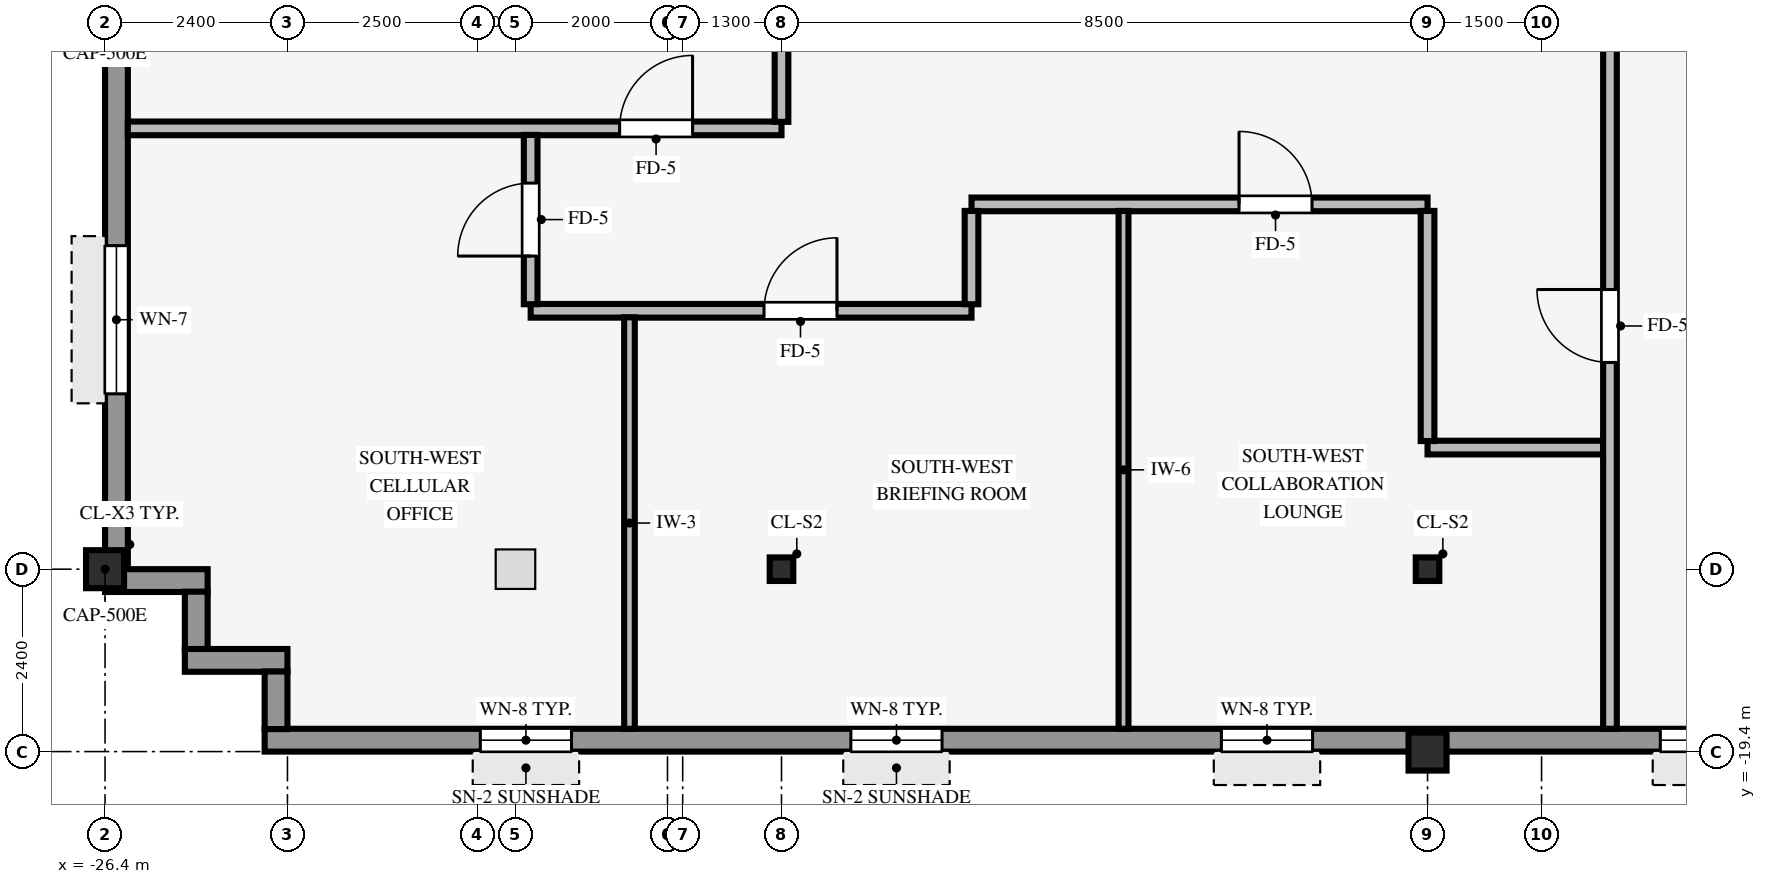
"""IFC4 building model, lengths in metres.
Left out: names, types, materials, properties, quantities, classifications, styles, units other than length and angle.
Written with IfcOpenShell. Run it as: python <this file> out.ifc"""

import sys

from ifc_helpers import new_model, si_unit, direction, frame, frame_2d, origin, origin_2d, place, context, subcontext, project, spatial, rectangle, hollow_rectangle, i_section, extrude, source, transform, mapped, element, fill, save


model = new_model("IFC4")
c1 = context("Model", 3, precision=1e-05, world=origin(), true_north=direction((0.0, 1.0)))
c2 = subcontext(c1, "Body", "Model", "MODEL_VIEW")
j1 = project(units=[si_unit("LENGTHUNIT", "METRE"), si_unit("PLANEANGLEUNIT", "RADIAN")], contexts=[c1])
p1 = place(None, origin())
s1 = spatial("IfcSite", under=j1, at=p1, CompositionType="ELEMENT")
p2 = place(p1, origin())
s2 = spatial("IfcBuilding", under=s1, at=p2, CompositionType="ELEMENT")
p3 = place(p2, frame((0.0, 0.0, 242.0)))
s3 = spatial("IfcBuildingStorey", under=s2, at=p3, CompositionType="ELEMENT", Elevation=242.0)
for number, where, z_axis, x_axis in (
    (1, (-26.4, -17.0, 0.0), (0.0, 0.0, 1.0), (1.0, 0.0, 0.0)),
    (2, (-9.0, -19.4, 0.0), (0.0, 0.0, 1.0), (1.0, 0.0, 0.0)),
):
    element("IfcColumn", number, at=place(p3, frame(where, z_axis=z_axis, x_axis=x_axis)), inside=s3, PredefinedType="COLUMN", context=c2, shape_type="SweptSolid", body=[
        extrude(hollow_rectangle(XDim=0.5, YDim=0.5, WallThickness=0.032, InnerFilletRadius=0.032, OuterFilletRadius=0.064, at=origin_2d()), origin(), (0.0, 0.0, 1.0), 3.25),
    ])
for number, where, z_axis, x_axis in (
    (3, (-17.5, -17.0, 0.0), (0.0, 0.0, 1.0), (1.0, 0.0, 0.0)),
    (4, (-9.0, -17.0, 0.0), (0.0, 0.0, 1.0), (1.0, 0.0, 0.0)),
):
    element("IfcColumn", number, at=place(p3, frame(where, z_axis=z_axis, x_axis=x_axis)), inside=s3, PredefinedType="COLUMN", context=c2, shape_type="SweptSolid", body=[
        extrude(i_section(OverallWidth=0.31, OverallDepth=0.31, WebThickness=0.015, FlangeThickness=0.015, FilletRadius=0.015, at=origin_2d()), origin(), (0.0, 0.0, 1.0), 3.25),
    ])
p4 = place(p3, frame((-24.3, -19.25, 0.0), z_axis=(0.0, 0.0, 1.0), x_axis=(1.0, 0.0, 0.0)))
e5 = element("IfcWall", 5, at=p4, inside=s3, PredefinedType="STANDARD", context=c2, shape_type="SweptSolid", body=[
    extrude(rectangle(XDim=41.0, YDim=0.3, at=frame_2d((20.5, 0.0))), origin(), (0.0, 0.0, 1.0), 2.585),
])
p5 = place(p4, frame((2.837, 0.0, 0.8)))
e6 = element("IfcOpeningElement", 6, at=p5, cuts=e5, PredefinedType="OPENING", context=c2, shape_type="SweptSolid", body=[
    extrude(rectangle(XDim=1.2, YDim=1.48, at=frame_2d((0.6, 0.74))), frame((0.0, 0.16, 0.0), z_axis=(0.0, -1.0, 0.0), x_axis=(1.0, 0.0, 0.0)), (0.0, 0.0, 1.0), 0.32),
])
p6 = place(p4, frame((7.712, 0.0, 0.8)))
e7 = element("IfcOpeningElement", 7, at=p6, cuts=e5, PredefinedType="OPENING", context=c2, shape_type="SweptSolid", body=[
    extrude(rectangle(XDim=1.2, YDim=1.48, at=frame_2d((0.6, 0.74))), frame((0.0, 0.16, 0.0), z_axis=(0.0, -1.0, 0.0), x_axis=(1.0, 0.0, 0.0)), (0.0, 0.0, 1.0), 0.32),
])
p7 = place(p4, frame((12.587, 0.0, 0.8)))
e8 = element("IfcOpeningElement", 8, at=p7, cuts=e5, PredefinedType="OPENING", context=c2, shape_type="SweptSolid", body=[
    extrude(rectangle(XDim=1.2, YDim=1.48, at=frame_2d((0.6, 0.74))), frame((0.0, 0.16, 0.0), z_axis=(0.0, -1.0, 0.0), x_axis=(1.0, 0.0, 0.0)), (0.0, 0.0, 1.0), 0.32),
])
p8 = place(p4, frame((18.363, 0.0, 0.8)))
e9 = element("IfcOpeningElement", 9, at=p8, cuts=e5, PredefinedType="OPENING", context=c2, shape_type="SweptSolid", body=[
    extrude(rectangle(XDim=1.2, YDim=1.48, at=frame_2d((0.6, 0.74))), frame((0.0, 0.16, 0.0), z_axis=(0.0, -1.0, 0.0), x_axis=(1.0, 0.0, 0.0)), (0.0, 0.0, 1.0), 0.32),
])
p9 = place(p4, frame((21.887, 0.0, 0.8)))
e10 = element("IfcOpeningElement", 10, at=p9, cuts=e5, PredefinedType="OPENING", context=c2, shape_type="SweptSolid", body=[
    extrude(rectangle(XDim=1.2, YDim=1.48, at=frame_2d((0.6, 0.74))), frame((0.0, 0.16, 0.0), z_axis=(0.0, -1.0, 0.0), x_axis=(1.0, 0.0, 0.0)), (0.0, 0.0, 1.0), 0.32),
])
p10 = place(p4, frame((27.212, 0.0, 0.8)))
e11 = element("IfcOpeningElement", 11, at=p10, cuts=e5, PredefinedType="OPENING", context=c2, shape_type="SweptSolid", body=[
    extrude(rectangle(XDim=1.2, YDim=1.48, at=frame_2d((0.6, 0.74))), frame((0.0, 0.16, 0.0), z_axis=(0.0, -1.0, 0.0), x_axis=(1.0, 0.0, 0.0)), (0.0, 0.0, 1.0), 0.32),
])
p11 = place(p4, frame((31.188, 0.0, 0.8)))
e12 = element("IfcOpeningElement", 12, at=p11, cuts=e5, PredefinedType="OPENING", context=c2, shape_type="SweptSolid", body=[
    extrude(rectangle(XDim=1.2, YDim=1.48, at=frame_2d((0.6, 0.74))), frame((0.0, 0.16, 0.0), z_axis=(0.0, -1.0, 0.0), x_axis=(1.0, 0.0, 0.0)), (0.0, 0.0, 1.0), 0.32),
])
p12 = place(p4, frame((36.962, 0.0, 0.8)))
e13 = element("IfcOpeningElement", 13, at=p12, cuts=e5, PredefinedType="OPENING", context=c2, shape_type="SweptSolid", body=[
    extrude(rectangle(XDim=1.2, YDim=1.48, at=frame_2d((0.6, 0.74))), frame((0.0, 0.16, 0.0), z_axis=(0.0, -1.0, 0.0), x_axis=(1.0, 0.0, 0.0)), (0.0, 0.0, 1.0), 0.32),
])
p13 = place(p3, frame((-26.25, -17.004, 0.0), z_axis=(0.0, 0.0, 1.0), x_axis=(0.0, 1.0, 0.0)))
e14 = element("IfcWall", 14, at=p13, inside=s3, PredefinedType="STANDARD", context=c2, shape_type="SweptSolid", body=[
    extrude(rectangle(XDim=34.008, YDim=0.3, at=frame_2d((17.004, 0.0))), origin(), (0.0, 0.0, 1.0), 2.812),
])
p14 = place(p13, frame((2.311, 0.0, 0.8)))
e15 = element("IfcOpeningElement", 15, at=p14, cuts=e14, PredefinedType="OPENING", context=c2, shape_type="SweptSolid", body=[
    extrude(rectangle(XDim=1.95, YDim=1.48, at=frame_2d((0.975, 0.74))), frame((0.0, 0.16, 0.0), z_axis=(0.0, -1.0, 0.0), x_axis=(1.0, 0.0, 0.0)), (0.0, 0.0, 1.0), 0.32),
])
p15 = place(p13, frame((8.234, 0.0, 0.8)))
e16 = element("IfcOpeningElement", 16, at=p15, cuts=e14, PredefinedType="OPENING", context=c2, shape_type="SweptSolid", body=[
    extrude(rectangle(XDim=1.95, YDim=1.48, at=frame_2d((0.975, 0.74))), frame((0.0, 0.16, 0.0), z_axis=(0.0, -1.0, 0.0), x_axis=(1.0, 0.0, 0.0)), (0.0, 0.0, 1.0), 0.32),
])
p16 = place(p13, frame((11.456, 0.0, 0.8)))
e17 = element("IfcOpeningElement", 17, at=p16, cuts=e14, PredefinedType="OPENING", context=c2, shape_type="SweptSolid", body=[
    extrude(rectangle(XDim=1.95, YDim=1.48, at=frame_2d((0.975, 0.74))), frame((0.0, 0.16, 0.0), z_axis=(0.0, -1.0, 0.0), x_axis=(1.0, 0.0, 0.0)), (0.0, 0.0, 1.0), 0.32),
])
p17 = place(p13, frame((20.602, 0.0, 0.8)))
e18 = element("IfcOpeningElement", 18, at=p17, cuts=e14, PredefinedType="OPENING", context=c2, shape_type="SweptSolid", body=[
    extrude(rectangle(XDim=1.95, YDim=1.48, at=frame_2d((0.975, 0.74))), frame((0.0, 0.16, 0.0), z_axis=(0.0, -1.0, 0.0), x_axis=(1.0, 0.0, 0.0)), (0.0, 0.0, 1.0), 0.32),
])
p18 = place(p13, frame((23.824, 0.0, 0.8)))
e19 = element("IfcOpeningElement", 19, at=p18, cuts=e14, PredefinedType="OPENING", context=c2, shape_type="SweptSolid", body=[
    extrude(rectangle(XDim=1.95, YDim=1.48, at=frame_2d((0.975, 0.74))), frame((0.0, 0.16, 0.0), z_axis=(0.0, -1.0, 0.0), x_axis=(1.0, 0.0, 0.0)), (0.0, 0.0, 1.0), 0.32),
])
p19 = place(p13, frame((29.747, 0.0, 0.8)))
e20 = element("IfcOpeningElement", 20, at=p19, cuts=e14, PredefinedType="OPENING", context=c2, shape_type="SweptSolid", body=[
    extrude(rectangle(XDim=1.95, YDim=1.48, at=frame_2d((0.975, 0.74))), frame((0.0, 0.16, 0.0), z_axis=(0.0, -1.0, 0.0), x_axis=(1.0, 0.0, 0.0)), (0.0, 0.0, 1.0), 0.32),
])
p20 = place(p3, frame((-26.4, -17.15, 0.0), z_axis=(0.0, 0.0, 1.0), x_axis=(1.0, 0.0, 0.0)))
e21 = element("IfcWall", 21, at=p20, inside=s3, PredefinedType="STANDARD", context=c2, shape_type="SweptSolid", body=[
    extrude(rectangle(XDim=1.35, YDim=0.3, at=frame_2d((0.675, 0.0))), origin(), (0.0, 0.0, 1.0), 1.835),
])
p21 = place(p3, frame((-25.2, -18.054, 0.0), z_axis=(0.0, 0.0, 1.0), x_axis=(0.0, 1.0, 0.0)))
e22 = element("IfcWall", 22, at=p21, inside=s3, PredefinedType="STANDARD", context=c2, shape_type="SweptSolid", body=[
    extrude(rectangle(XDim=0.758, YDim=0.3, at=frame_2d((0.379, 0.0))), origin(), (0.0, 0.0, 1.0), 1.835),
])
p22 = place(p3, frame((-25.35, -18.2, 0.0), z_axis=(0.0, 0.0, 1.0), x_axis=(1.0, 0.0, 0.0)))
e23 = element("IfcWall", 23, at=p22, inside=s3, PredefinedType="STANDARD", context=c2, shape_type="SweptSolid", body=[
    extrude(rectangle(XDim=1.35, YDim=0.3, at=frame_2d((0.675, 0.0))), origin(), (0.0, 0.0, 1.0), 1.835),
])
p23 = place(p3, frame((-24.15, -19.104, 0.0), z_axis=(0.0, 0.0, 1.0), x_axis=(0.0, 1.0, 0.0)))
e24 = element("IfcWall", 24, at=p23, inside=s3, PredefinedType="STANDARD", context=c2, shape_type="SweptSolid", body=[
    extrude(rectangle(XDim=0.758, YDim=0.3, at=frame_2d((0.379, 0.0))), origin(), (0.0, 0.0, 1.0), 1.835),
])
p24 = place(p3, frame((-9.0, -15.4, 0.0), z_axis=(0.0, 0.0, 1.0), x_axis=(1.0, 0.0, 0.0)))
e25 = element("IfcWall", 25, at=p24, inside=s3, PredefinedType="PARTITIONING", context=c2, shape_type="SweptSolid", body=[
    extrude(rectangle(XDim=2.339, YDim=0.18, at=frame_2d((1.169, 0.0))), origin(), (0.0, 0.0, 1.0), 3.24),
])
p25 = place(p3, frame((-20.8, -13.6, 0.0), z_axis=(0.0, 0.0, 1.0), x_axis=(1.0, 0.0, 0.0)))
e26 = element("IfcWall", 26, at=p25, inside=s3, PredefinedType="PARTITIONING", context=c2, shape_type="SweptSolid", body=[
    extrude(rectangle(XDim=5.8, YDim=0.18, at=frame_2d((2.9, 0.0))), origin(), (0.0, 0.0, 1.0), 2.929),
])
p26 = place(p25, frame((3.07, 0.0, 0.0)))
e27 = element("IfcOpeningElement", 27, at=p26, cuts=e26, PredefinedType="OPENING", context=c2, shape_type="SweptSolid", body=[
    extrude(rectangle(XDim=0.96, YDim=2.1, at=frame_2d((0.48, 1.05))), frame((0.0, 0.1, 0.0), z_axis=(0.0, -1.0, 0.0), x_axis=(1.0, 0.0, 0.0)), (0.0, 0.0, 1.0), 0.2),
])
p27 = place(p3, frame((-15.0, -12.2, 0.0), z_axis=(0.0, 0.0, 1.0), x_axis=(1.0, 0.0, 0.0)))
e28 = element("IfcWall", 28, at=p27, inside=s3, PredefinedType="PARTITIONING", context=c2, shape_type="SweptSolid", body=[
    extrude(rectangle(XDim=6.0, YDim=0.18, at=frame_2d((3.0, 0.0))), origin(), (0.0, 0.0, 1.0), 3.24),
])
p28 = place(p27, frame((3.52, 0.0, 0.0)))
e29 = element("IfcOpeningElement", 29, at=p28, cuts=e28, PredefinedType="OPENING", context=c2, shape_type="SweptSolid", body=[
    extrude(rectangle(XDim=0.96, YDim=2.1, at=frame_2d((0.48, 1.05))), frame((0.0, 0.1, 0.0), z_axis=(0.0, -1.0, 0.0), x_axis=(1.0, 0.0, 0.0)), (0.0, 0.0, 1.0), 0.2),
])
p29 = place(p3, frame((-26.1, -11.2, 0.0), z_axis=(0.0, 0.0, 1.0), x_axis=(1.0, 0.0, 0.0)))
e30 = element("IfcWall", 30, at=p29, inside=s3, PredefinedType="PARTITIONING", context=c2, shape_type="SweptSolid", body=[
    extrude(rectangle(XDim=8.6, YDim=0.18, at=frame_2d((4.3, 0.0))), origin(), (0.0, 0.0, 1.0), 3.24),
])
p30 = place(p29, frame((6.47, 0.0, 0.0)))
e31 = element("IfcOpeningElement", 31, at=p30, cuts=e30, PredefinedType="OPENING", context=c2, shape_type="SweptSolid", body=[
    extrude(rectangle(XDim=0.96, YDim=2.1, at=frame_2d((0.48, 1.05))), frame((0.0, 0.1, 0.0), z_axis=(0.0, -1.0, 0.0), x_axis=(1.0, 0.0, 0.0)), (0.0, 0.0, 1.0), 0.2),
])
p31 = place(p3, frame((-20.8, -13.514, 0.0), z_axis=(0.0, 0.0, 1.0), x_axis=(0.0, 1.0, 0.0)))
e32 = element("IfcWall", 32, at=p31, inside=s3, PredefinedType="PARTITIONING", context=c2, shape_type="SweptSolid", body=[
    extrude(rectangle(XDim=2.228, YDim=0.18, at=frame_2d((1.114, 0.0))), origin(), (0.0, 0.0, 1.0), 2.585),
])
p32 = place(p31, frame((0.634, 0.0, 0.0)))
e33 = element("IfcOpeningElement", 33, at=p32, cuts=e32, PredefinedType="OPENING", context=c2, shape_type="SweptSolid", body=[
    extrude(rectangle(XDim=0.96, YDim=2.1, at=frame_2d((0.48, 1.05))), frame((0.0, 0.1, 0.0), z_axis=(0.0, -1.0, 0.0), x_axis=(1.0, 0.0, 0.0)), (0.0, 0.0, 1.0), 0.2),
])
p33 = place(p3, frame((-19.5, -19.1, 0.0), z_axis=(0.0, 0.0, 1.0), x_axis=(0.0, 1.0, 0.0)))
e34 = element("IfcWall", 34, at=p33, inside=s3, PredefinedType="PARTITIONING", context=c2, shape_type="SweptSolid", body=[
    extrude(rectangle(XDim=5.414, YDim=0.14, at=frame_2d((2.707, 0.0))), origin(), (0.0, 0.0, 1.0), 3.24),
])
p34 = place(p3, frame((-17.5, -11.114, 0.0), z_axis=(0.0, 0.0, 1.0), x_axis=(0.0, 1.0, 0.0)))
e35 = element("IfcWall", 35, at=p34, inside=s3, PredefinedType="PARTITIONING", context=c2, shape_type="SweptSolid", body=[
    extrude(rectangle(XDim=1.118, YDim=0.18, at=frame_2d((0.559, 0.0))), origin(), (0.0, 0.0, 1.0), 2.772),
])
p35 = place(p3, frame((-15.0, -13.514, 0.0), z_axis=(0.0, 0.0, 1.0), x_axis=(0.0, 1.0, 0.0)))
e36 = element("IfcWall", 36, at=p35, inside=s3, PredefinedType="PARTITIONING", context=c2, shape_type="SweptSolid", body=[
    extrude(rectangle(XDim=1.228, YDim=0.18, at=frame_2d((0.614, 0.0))), origin(), (0.0, 0.0, 1.0), 3.24),
])
p36 = place(p3, frame((-13.0, -19.1, 0.0), z_axis=(0.0, 0.0, 1.0), x_axis=(0.0, 1.0, 0.0)))
e37 = element("IfcWall", 37, at=p36, inside=s3, PredefinedType="PARTITIONING", context=c2, shape_type="SweptSolid", body=[
    extrude(rectangle(XDim=6.814, YDim=0.13, at=frame_2d((3.407, 0.0))), origin(), (0.0, 0.0, 1.0), 3.24),
])
p37 = place(p3, frame((-9.0, -15.314, 0.0), z_axis=(0.0, 0.0, 1.0), x_axis=(0.0, 1.0, 0.0)))
e38 = element("IfcWall", 38, at=p37, inside=s3, PredefinedType="PARTITIONING", context=c2, shape_type="SweptSolid", body=[
    extrude(rectangle(XDim=3.028, YDim=0.18, at=frame_2d((1.514, 0.0))), origin(), (0.0, 0.0, 1.0), 2.772),
])
p38 = place(p3, frame((-6.6, -19.1, 0.0), z_axis=(0.0, 0.0, 1.0), x_axis=(0.0, 1.0, 0.0)))
e39 = element("IfcWall", 39, at=p38, inside=s3, PredefinedType="PARTITIONING", context=c2, shape_type="SweptSolid", body=[
    extrude(rectangle(XDim=17.764, YDim=0.18, at=frame_2d((8.882, 0.0))), origin(), (0.0, 0.0, 1.0), 3.24),
])
p39 = place(p38, frame((13.152, 0.0, 0.0)))
e40 = element("IfcOpeningElement", 40, at=p39, cuts=e39, PredefinedType="OPENING", context=c2, shape_type="SweptSolid", body=[
    extrude(rectangle(XDim=0.96, YDim=2.1, at=frame_2d((0.48, 1.05))), frame((0.0, 0.1, 0.0), z_axis=(0.0, -1.0, 0.0), x_axis=(1.0, 0.0, 0.0)), (0.0, 0.0, 1.0), 0.2),
])
p40 = place(p38, frame((4.82, 0.0, 0.0)))
e41 = element("IfcOpeningElement", 41, at=p40, cuts=e39, PredefinedType="OPENING", context=c2, shape_type="SweptSolid", body=[
    extrude(rectangle(XDim=0.96, YDim=2.1, at=frame_2d((0.48, 1.05))), frame((0.0, 0.1, 0.0), z_axis=(0.0, -1.0, 0.0), x_axis=(1.0, 0.0, 0.0)), (0.0, 0.0, 1.0), 0.2),
])
m1 = source(origin(), c2, "Body", "SweptSolid", [
    extrude(rectangle(XDim=1.2, YDim=1.48, at=frame_2d((0.6, 0.74))), frame((0.0, 0.03, 0.0), z_axis=(0.0, -1.0, 0.0), x_axis=(1.0, 0.0, 0.0)), (0.0, 0.0, 1.0), 0.06),
])
p41 = place(p5, origin())
e42 = element("IfcWindow", 42, at=p41, inside=s3, PartitioningType="SINGLE_PANEL", PredefinedType="WINDOW", context=c2, shape_type="MappedRepresentation", body=[
    mapped(m1, transform((0.0, 0.0, 0.0), scale=1.0)),
])
fill(e6, e42)
p42 = place(p6, origin())
e43 = element("IfcWindow", 43, at=p42, inside=s3, PartitioningType="SINGLE_PANEL", PredefinedType="WINDOW", context=c2, shape_type="MappedRepresentation", body=[
    mapped(m1, transform((0.0, 0.0, 0.0), scale=1.0)),
])
fill(e7, e43)
p43 = place(p7, origin())
e44 = element("IfcWindow", 44, at=p43, inside=s3, PartitioningType="SINGLE_PANEL", PredefinedType="WINDOW", context=c2, shape_type="MappedRepresentation", body=[
    mapped(m1, transform((0.0, 0.0, 0.0), scale=1.0)),
])
fill(e8, e44)
p44 = place(p8, origin())
e45 = element("IfcWindow", 45, at=p44, inside=s3, PartitioningType="SINGLE_PANEL", PredefinedType="WINDOW", context=c2, shape_type="MappedRepresentation", body=[
    mapped(m1, transform((0.0, 0.0, 0.0), scale=1.0)),
])
fill(e9, e45)
m2 = source(origin(), c2, "Body", "SweptSolid", [
    extrude(rectangle(XDim=1.95, YDim=1.48, at=frame_2d((0.975, 0.74))), frame((0.0, 0.03, 0.0), z_axis=(0.0, -1.0, 0.0), x_axis=(1.0, 0.0, 0.0)), (0.0, 0.0, 1.0), 0.06),
])
p45 = place(p14, origin())
e46 = element("IfcWindow", 46, at=p45, inside=s3, PartitioningType="SINGLE_PANEL", PredefinedType="WINDOW", context=c2, shape_type="MappedRepresentation", body=[
    mapped(m2, transform((0.0, 0.0, 0.0), scale=1.0)),
])
fill(e15, e46)
m3 = source(origin(), c2, "Body", "SweptSolid", [
    extrude(rectangle(XDim=0.96, YDim=2.1, at=frame_2d((0.48, 1.05))), frame((0.0, 0.025, 0.0), z_axis=(0.0, -1.0, 0.0), x_axis=(1.0, 0.0, 0.0)), (0.0, 0.0, 1.0), 0.05),
])
p46 = place(p26, origin())
e47 = element("IfcDoor", 47, at=p46, inside=s3, OperationType="SINGLE_SWING_RIGHT", PredefinedType="DOOR", context=c2, shape_type="MappedRepresentation", body=[
    mapped(m3, transform((0.0, 0.0, 0.0), scale=1.0)),
])
fill(e27, e47)
p47 = place(p28, origin())
e48 = element("IfcDoor", 48, at=p47, inside=s3, OperationType="SINGLE_SWING_LEFT", PredefinedType="DOOR", context=c2, shape_type="MappedRepresentation", body=[
    mapped(m3, transform((0.0, 0.0, 0.0), scale=1.0)),
])
fill(e29, e48)
p48 = place(p30, origin())
e49 = element("IfcDoor", 49, at=p48, inside=s3, OperationType="SINGLE_SWING_RIGHT", PredefinedType="DOOR", context=c2, shape_type="MappedRepresentation", body=[
    mapped(m3, transform((0.0, 0.0, 0.0), scale=1.0)),
])
fill(e31, e49)
p49 = place(p40, origin())
e50 = element("IfcDoor", 50, at=p49, inside=s3, OperationType="SINGLE_SWING_RIGHT", PredefinedType="DOOR", context=c2, shape_type="MappedRepresentation", body=[
    mapped(m3, transform((0.0, 0.0, 0.0), scale=1.0)),
])
fill(e41, e50)
p50 = place(p32, origin())
e51 = element("IfcDoor", 51, at=p50, inside=s3, OperationType="SINGLE_SWING_LEFT", PredefinedType="DOOR", context=c2, shape_type="MappedRepresentation", body=[
    mapped(m3, transform((0.0, 0.0, 0.0), scale=1.0)),
])
fill(e33, e51)
save(model, sys.argv[1])
